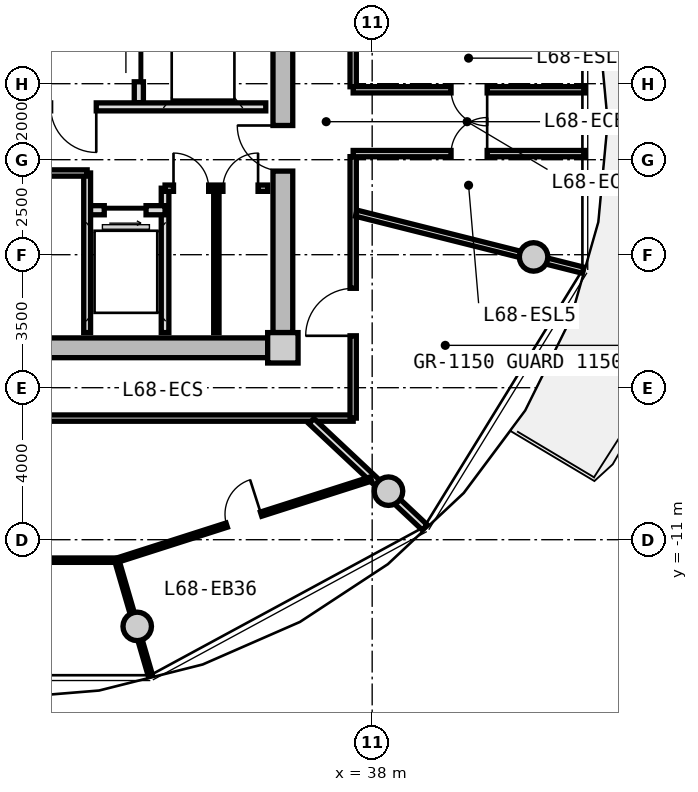
"""IFC4 building model, lengths in metres.
Left out: names, types, materials, properties, quantities, classifications, styles, units other than length and angle.
Written with IfcOpenShell. Run it as: python <this file> out.ifc"""

import sys

from ifc_helpers import new_model, si_unit, direction, frame, frame_2d, origin, origin_2d, place, context, subcontext, project, spatial, rectangle, circle, extrude, source, transform, mapped, element, fill, save


model = new_model("IFC4")
c1 = context("Model", 3, precision=1e-05, world=origin(), true_north=direction((0.0, 1.0)))
c2 = subcontext(c1, "Body", "Model", "MODEL_VIEW")
j1 = project(units=[si_unit("LENGTHUNIT", "METRE"), si_unit("PLANEANGLEUNIT", "RADIAN")], contexts=[c1])
p1 = place(None, origin())
s1 = spatial("IfcSite", under=j1, at=p1, CompositionType="ELEMENT")
p2 = place(p1, origin())
s2 = spatial("IfcBuilding", under=s1, at=p2, CompositionType="ELEMENT")
p3 = place(p2, frame((0.0, 0.0, 220.0)))
s3 = spatial("IfcBuildingStorey", under=s2, at=p3, CompositionType="ELEMENT", Elevation=220.0)
m1 = source(origin(), c2, "Body", "SweptSolid", [
    extrude(rectangle(XDim=0.8, YDim=0.8, at=origin_2d()), origin(), (0.0, 0.0, 1.0), 3.05),
])
p4 = place(p3, frame((35.65, -5.95, 0.0), z_axis=(0.0, 0.0, 1.0), x_axis=(1.0, 0.0, 0.0)))
e1 = element("IfcColumn", 1, at=p4, inside=s3, PredefinedType="COLUMN", context=c2, shape_type="MappedRepresentation", body=[
    mapped(m1, transform((0.0, 0.0, 0.0), x_axis=(1.0, 0.0, 0.0), y_axis=(0.0, 1.0, 0.0), z_axis=(0.0, 0.0, 1.0), scale=1.0)),
])
m2 = source(origin(), c2, "Body", "SweptSolid", [
    extrude(rectangle(XDim=14.5, YDim=0.52, at=frame_2d((7.25, 0.0))), origin(), (0.0, 0.0, 1.0), 2.76),
])
p5 = place(p3, frame((35.25, -5.95, 0.0), z_axis=(0.0, 0.0, 1.0), x_axis=(-1.0, 0.0, 0.0)))
e2 = element("IfcWall", 2, at=p5, inside=s3, PredefinedType="SHEAR", context=c2, shape_type="MappedRepresentation", body=[
    mapped(m2, transform((0.0, 0.0, 0.0), x_axis=(1.0, 0.0, 0.0), y_axis=(0.0, 1.0, 0.0), z_axis=(0.0, 0.0, 1.0), scale=1.0)),
])
m3 = source(origin(), c2, "Body", "SweptSolid", [
    extrude(rectangle(XDim=11.1, YDim=0.52, at=frame_2d((5.55, 0.0))), origin(), (0.0, 0.0, 1.0), 2.76),
])
p6 = place(p3, frame((35.65, 5.55, 0.0), z_axis=(0.0, 0.0, 1.0), x_axis=(0.0, -1.0, 0.0)))
e3 = element("IfcWall", 3, at=p6, inside=s3, PredefinedType="SHEAR", context=c2, shape_type="MappedRepresentation", body=[
    mapped(m3, transform((0.0, 0.0, 0.0), x_axis=(1.0, 0.0, 0.0), y_axis=(0.0, 1.0, 0.0), z_axis=(0.0, 0.0, 1.0), scale=1.0)),
])
p7 = place(p6, frame((5.65, 0.0, 0.0)))
e4 = element("IfcOpeningElement", 4, at=p7, cuts=e3, PredefinedType="OPENING", context=c2, shape_type="SweptSolid", body=[
    extrude(rectangle(XDim=1.2, YDim=2.15, at=frame_2d((0.6, 1.075))), frame((0.0, 0.27, 0.0), z_axis=(0.0, -1.0, 0.0), x_axis=(1.0, 0.0, 0.0)), (0.0, 0.0, 1.0), 0.54),
])
m4 = source(origin(), c2, "Body", "SweptSolid", [
    extrude(circle(Radius=0.375, at=origin_2d()), origin(), (0.0, 0.0, 1.0), 3.05),
])
for number, where, z_axis, x_axis in (
    (5, (31.818, -13.281, 0.0), (0.0, 0.0, 1.0), (1.0, 0.0, 0.0)),
    (6, (38.43, -9.723, 0.0), (0.0, 0.0, 1.0), (1.0, 0.0, 0.0)),
    (7, (42.247, -3.559, 0.0), (0.0, 0.0, 1.0), (1.0, 0.0, 0.0)),
):
    element("IfcColumn", number, at=place(p3, frame(where, z_axis=z_axis, x_axis=x_axis)), inside=s3, PredefinedType="COLUMN", context=c2, shape_type="MappedRepresentation", body=[
        mapped(m4, transform((0.0, 0.0, 0.0), x_axis=(1.0, 0.0, 0.0), y_axis=(0.0, 1.0, 0.0), z_axis=(0.0, 0.0, 1.0), scale=1.0)),
    ])
m5 = source(origin(), c2, "Body", "SweptSolid", [
    extrude(rectangle(XDim=5.0, YDim=0.24, at=frame_2d((2.5, 0.0))), origin(), (0.0, 0.0, 1.0), 2.745),
])
p8 = place(p3, frame((31.86, 0.5, 0.0), z_axis=(0.0, 0.0, 1.0), x_axis=(0.0, 1.0, 0.0)))
e8 = element("IfcWall", 8, at=p8, inside=s3, PredefinedType="PARTITIONING", context=c2, shape_type="MappedRepresentation", body=[
    mapped(m5, transform((0.0, 0.0, 0.0), x_axis=(1.0, 0.0, 0.0), y_axis=(0.0, 1.0, 0.0), z_axis=(0.0, 0.0, 1.0), scale=1.0)),
])
p9 = place(p8, frame((3.05, 0.0, 0.0)))
e9 = element("IfcOpeningElement", 9, at=p9, cuts=e8, PredefinedType="OPENING", context=c2, shape_type="SweptSolid", body=[
    extrude(rectangle(XDim=1.3, YDim=2.2, at=frame_2d((0.65, 1.1))), frame((0.0, 0.13, 0.0), z_axis=(0.0, -1.0, 0.0), x_axis=(1.0, 0.0, 0.0)), (0.0, 0.0, 1.0), 0.26),
])
p10 = place(p8, frame((0.55, 0.0, 0.0)))
e10 = element("IfcOpeningElement", 10, at=p10, cuts=e8, PredefinedType="OPENING", context=c2, shape_type="SweptSolid", body=[
    extrude(rectangle(XDim=1.3, YDim=2.2, at=frame_2d((0.65, 1.1))), frame((0.0, 0.13, 0.0), z_axis=(0.0, -1.0, 0.0), x_axis=(1.0, 0.0, 0.0)), (0.0, 0.0, 1.0), 0.26),
])
m6 = source(origin(), c2, "Body", "SweptSolid", [
    extrude(rectangle(XDim=6.66, YDim=0.21, at=frame_2d((3.33, 0.0))), origin(), (0.0, 0.0, 1.0), 2.745),
])
p11 = place(p3, frame((28.54, 0.39, 0.0), z_axis=(0.0, 0.0, 1.0), x_axis=(1.0, 0.0, 0.0)))
e11 = element("IfcWall", 11, at=p11, inside=s3, PredefinedType="PARTITIONING", context=c2, shape_type="MappedRepresentation", body=[
    mapped(m6, transform((0.0, 0.0, 0.0), x_axis=(1.0, 0.0, 0.0), y_axis=(0.0, 1.0, 0.0), z_axis=(0.0, 0.0, 1.0), scale=1.0)),
])
p12 = place(p11, frame((1.0, 0.0, 0.0)))
e12 = element("IfcOpeningElement", 12, at=p12, cuts=e11, PredefinedType="OPENING", context=c2, shape_type="SweptSolid", body=[
    extrude(rectangle(XDim=1.2, YDim=2.15, at=frame_2d((0.6, 1.075))), frame((0.0, 0.115, 0.0), z_axis=(0.0, -1.0, 0.0), x_axis=(1.0, 0.0, 0.0)), (0.0, 0.0, 1.0), 0.23),
])
m7 = source(origin(), c2, "Body", "SweptSolid", [
    extrude(rectangle(XDim=3.8, YDim=0.2, at=frame_2d((1.9, 0.0))), origin(), (0.0, 0.0, 1.0), 2.745),
])
p13 = place(p3, frame((32.55, -5.55, 0.0), z_axis=(0.0, 0.0, 1.0), x_axis=(0.0, 1.0, 0.0)))
e13 = element("IfcWall", 13, at=p13, inside=s3, PredefinedType="PARTITIONING", context=c2, shape_type="MappedRepresentation", body=[
    mapped(m7, transform((0.0, 0.0, 0.0), x_axis=(1.0, 0.0, 0.0), y_axis=(0.0, 1.0, 0.0), z_axis=(0.0, 0.0, 1.0), scale=1.0)),
])
m8 = source(origin(), c2, "Body", "SweptSolid", [
    extrude(rectangle(XDim=2.05, YDim=0.24, at=frame_2d((1.025, 0.0))), origin(), (0.0, 0.0, 1.0), 2.745),
])
p14 = place(p3, frame((30.5, -2.33, 0.0), z_axis=(0.0, 0.0, 1.0), x_axis=(1.0, 0.0, 0.0)))
e14 = element("IfcWall", 14, at=p14, inside=s3, PredefinedType="PARTITIONING", context=c2, shape_type="MappedRepresentation", body=[
    mapped(m8, transform((0.0, 0.0, 0.0), x_axis=(1.0, 0.0, 0.0), y_axis=(0.0, 1.0, 0.0), z_axis=(0.0, 0.0, 1.0), scale=1.0)),
])
p15 = place(p14, frame((0.45, 0.0, 0.0)))
e15 = element("IfcOpeningElement", 15, at=p15, cuts=e14, PredefinedType="OPENING", context=c2, shape_type="SweptSolid", body=[
    extrude(rectangle(XDim=1.1, YDim=2.2, at=frame_2d((0.55, 1.1))), frame((0.0, 0.13, 0.0), z_axis=(0.0, -1.0, 0.0), x_axis=(1.0, 0.0, 0.0)), (0.0, 0.0, 1.0), 0.26),
])
m9 = source(origin(), c2, "Body", "SweptSolid", [
    extrude(rectangle(XDim=4.2, YDim=0.18, at=frame_2d((2.1, 0.0))), origin(), (0.0, 0.0, 1.0), 2.745),
])
p16 = place(p3, frame((30.5, -5.55, 0.0), z_axis=(0.0, 0.0, 1.0), x_axis=(0.0, 1.0, 0.0)))
e16 = element("IfcWall", 16, at=p16, inside=s3, PredefinedType="PARTITIONING", context=c2, shape_type="MappedRepresentation", body=[
    mapped(m9, transform((0.0, 0.0, 0.0), x_axis=(1.0, 0.0, 0.0), y_axis=(0.0, 1.0, 0.0), z_axis=(0.0, 0.0, 1.0), scale=1.0)),
])
m10 = source(origin(), c2, "Body", "SweptSolid", [
    extrude(rectangle(XDim=4.77, YDim=0.165, at=frame_2d((2.385, 0.0))), origin(), (0.0, 0.0, 1.0), 2.745),
])
p17 = place(p3, frame((25.73, -1.35, 0.0), z_axis=(0.0, 0.0, 1.0), x_axis=(1.0, 0.0, 0.0)))
e17 = element("IfcWall", 17, at=p17, inside=s3, PredefinedType="PARTITIONING", context=c2, shape_type="MappedRepresentation", body=[
    mapped(m10, transform((0.0, 0.0, 0.0), x_axis=(1.0, 0.0, 0.0), y_axis=(0.0, 1.0, 0.0), z_axis=(0.0, 0.0, 1.0), scale=1.0)),
])
p18 = place(p17, frame((1.85, 0.0, 0.0)))
e18 = element("IfcOpeningElement", 18, at=p18, cuts=e17, PredefinedType="OPENING", context=c2, shape_type="SweptSolid", body=[
    extrude(rectangle(XDim=1.0, YDim=2.1, at=frame_2d((0.5, 1.05))), frame((0.0, 0.093, 0.0), z_axis=(0.0, -1.0, 0.0), x_axis=(1.0, 0.0, 0.0)), (0.0, 0.0, 1.0), 0.185),
])
m11 = source(origin(), c2, "Body", "SweptSolid", [
    extrude(rectangle(XDim=2.7, YDim=0.165, at=frame_2d((1.35, 0.0))), origin(), (0.0, 0.0, 1.0), 2.745),
])
p19 = place(p3, frame((32.55, -1.75, 0.0), z_axis=(0.0, 0.0, 1.0), x_axis=(1.0, 0.0, 0.0)))
e19 = element("IfcWall", 19, at=p19, inside=s3, PredefinedType="PARTITIONING", context=c2, shape_type="MappedRepresentation", body=[
    mapped(m11, transform((0.0, 0.0, 0.0), x_axis=(1.0, 0.0, 0.0), y_axis=(0.0, 1.0, 0.0), z_axis=(0.0, 0.0, 1.0), scale=1.0)),
])
p20 = place(p19, frame((0.222, 0.0, 0.0)))
e20 = element("IfcOpeningElement", 20, at=p20, cuts=e19, PredefinedType="OPENING", context=c2, shape_type="SweptSolid", body=[
    extrude(rectangle(XDim=0.925, YDim=2.1, at=frame_2d((0.462, 1.05))), frame((0.0, 0.093, 0.0), z_axis=(0.0, -1.0, 0.0), x_axis=(1.0, 0.0, 0.0)), (0.0, 0.0, 1.0), 0.185),
])
p21 = place(p19, frame((1.522, 0.0, 0.0)))
e21 = element("IfcOpeningElement", 21, at=p21, cuts=e19, PredefinedType="OPENING", context=c2, shape_type="SweptSolid", body=[
    extrude(rectangle(XDim=0.925, YDim=2.1, at=frame_2d((0.462, 1.05))), frame((0.0, 0.093, 0.0), z_axis=(0.0, -1.0, 0.0), x_axis=(1.0, 0.0, 0.0)), (0.0, 0.0, 1.0), 0.185),
])
m12 = source(origin(), c2, "Body", "SweptSolid", [
    extrude(rectangle(XDim=3.8, YDim=0.14, at=frame_2d((1.9, 0.0))), origin(), (0.0, 0.0, 1.0), 2.745),
])
p22 = place(p3, frame((33.9, -5.55, 0.0), z_axis=(0.0, 0.0, 1.0), x_axis=(0.0, 1.0, 0.0)))
e22 = element("IfcWall", 22, at=p22, inside=s3, PredefinedType="PARTITIONING", context=c2, shape_type="MappedRepresentation", body=[
    mapped(m12, transform((0.0, 0.0, 0.0), x_axis=(1.0, 0.0, 0.0), y_axis=(0.0, 1.0, 0.0), z_axis=(0.0, 0.0, 1.0), scale=1.0)),
])
m13 = source(origin(), c2, "Body", "SweptSolid", [
    extrude(rectangle(XDim=19.0, YDim=0.165, at=frame_2d((9.5, 0.0))), origin(), (0.0, 0.0, 1.0), 2.745),
])
p23 = place(p3, frame((37.5, -7.8, 0.0), z_axis=(0.0, 0.0, 1.0), x_axis=(-1.0, 0.0, 0.0)))
e23 = element("IfcWall", 23, at=p23, inside=s3, PredefinedType="PARTITIONING", context=c2, shape_type="MappedRepresentation", body=[
    mapped(m13, transform((0.0, 0.0, 0.0), x_axis=(1.0, 0.0, 0.0), y_axis=(0.0, 1.0, 0.0), z_axis=(0.0, 0.0, 1.0), scale=1.0)),
])
p24 = place(p23, frame((9.392, 0.0, 0.0)))
e24 = element("IfcOpeningElement", 24, at=p24, cuts=e23, PredefinedType="OPENING", context=c2, shape_type="SweptSolid", body=[
    extrude(rectangle(XDim=1.05, YDim=2.15, at=frame_2d((0.525, 1.075))), frame((0.0, 0.093, 0.0), z_axis=(0.0, -1.0, 0.0), x_axis=(1.0, 0.0, 0.0)), (0.0, 0.0, 1.0), 0.185),
])
m14 = source(origin(), c2, "Body", "SweptSolid", [
    extrude(rectangle(XDim=6.88, YDim=0.165, at=frame_2d((3.44, 0.0))), origin(), (0.0, 0.0, 1.0), 2.745),
])
p25 = place(p3, frame((37.5, 7.8, 0.0), z_axis=(0.0, 0.0, 1.0), x_axis=(0.0, -1.0, 0.0)))
e25 = element("IfcWall", 25, at=p25, inside=s3, PredefinedType="PARTITIONING", context=c2, shape_type="MappedRepresentation", body=[
    mapped(m14, transform((0.0, 0.0, 0.0), x_axis=(1.0, 0.0, 0.0), y_axis=(0.0, 1.0, 0.0), z_axis=(0.0, 0.0, 1.0), scale=1.0)),
])
p26 = place(p3, frame((37.5, -0.92, 0.0), z_axis=(0.0, 0.0, 1.0), x_axis=(0.0, -1.0, 0.0)))
e26 = element("IfcWall", 26, at=p26, inside=s3, PredefinedType="PARTITIONING", context=c2, shape_type="MappedRepresentation", body=[
    mapped(m14, transform((0.0, 0.0, 0.0), x_axis=(1.0, 0.0, 0.0), y_axis=(0.0, 1.0, 0.0), z_axis=(0.0, 0.0, 1.0), scale=1.0)),
])
p27 = place(p26, frame((3.464, 0.0, 0.0)))
e27 = element("IfcOpeningElement", 27, at=p27, cuts=e26, PredefinedType="OPENING", context=c2, shape_type="SweptSolid", body=[
    extrude(rectangle(XDim=1.25, YDim=2.2, at=frame_2d((0.625, 1.1))), frame((0.0, 0.093, 0.0), z_axis=(0.0, -1.0, 0.0), x_axis=(1.0, 0.0, 0.0)), (0.0, 0.0, 1.0), 0.185),
])
m15 = source(origin(), c2, "Body", "SweptSolid", [
    extrude(rectangle(XDim=6.157, YDim=0.165, at=frame_2d((3.079, 0.0))), origin(), (0.0, 0.0, 1.0), 2.345),
])
p28 = place(p3, frame((37.58, -2.407, 0.0), z_axis=(0.0, 0.0, 1.0), x_axis=(0.969840867184, -0.243738984038, 0.0)))
e28 = element("IfcWall", 28, at=p28, inside=s3, PredefinedType="PARTITIONING", context=c2, shape_type="MappedRepresentation", body=[
    mapped(m15, transform((0.0, 0.0, 0.0), x_axis=(1.0, 0.0, 0.0), y_axis=(0.0, 1.0, 0.0), z_axis=(0.0, 0.0, 1.0), scale=1.0)),
])
m16 = source(origin(), c2, "Body", "SweptSolid", [
    extrude(rectangle(XDim=6.101, YDim=0.165, at=frame_2d((3.051, 0.0))), origin(), (0.0, 0.0, 1.0), 2.745),
])
p29 = place(p3, frame((37.5, 0.84, 0.0), z_axis=(0.0, 0.0, 1.0), x_axis=(1.0, 0.0, 0.0)))
e29 = element("IfcWall", 29, at=p29, inside=s3, PredefinedType="PARTITIONING", context=c2, shape_type="MappedRepresentation", body=[
    mapped(m16, transform((0.0, 0.0, 0.0), x_axis=(1.0, 0.0, 0.0), y_axis=(0.0, 1.0, 0.0), z_axis=(0.0, 0.0, 1.0), scale=1.0)),
])
p30 = place(p29, frame((2.576, 0.0, 0.0)))
e30 = element("IfcOpeningElement", 30, at=p30, cuts=e29, PredefinedType="OPENING", context=c2, shape_type="SweptSolid", body=[
    extrude(rectangle(XDim=0.95, YDim=2.1, at=frame_2d((0.475, 1.05))), frame((0.0, 0.093, 0.0), z_axis=(0.0, -1.0, 0.0), x_axis=(1.0, 0.0, 0.0)), (0.0, 0.0, 1.0), 0.185),
])
p31 = place(p3, frame((43.601, -0.84, 0.0), z_axis=(0.0, 0.0, 1.0), x_axis=(-1.0, 0.0, 0.0)))
e31 = element("IfcWall", 31, at=p31, inside=s3, PredefinedType="PARTITIONING", context=c2, shape_type="MappedRepresentation", body=[
    mapped(m16, transform((0.0, 0.0, 0.0), x_axis=(1.0, 0.0, 0.0), y_axis=(0.0, 1.0, 0.0), z_axis=(0.0, 0.0, 1.0), scale=1.0)),
])
p32 = place(p31, frame((2.576, 0.0, 0.0)))
e32 = element("IfcOpeningElement", 32, at=p32, cuts=e31, PredefinedType="OPENING", context=c2, shape_type="SweptSolid", body=[
    extrude(rectangle(XDim=0.95, YDim=2.1, at=frame_2d((0.475, 1.05))), frame((0.0, 0.093, 0.0), z_axis=(0.0, -1.0, 0.0), x_axis=(1.0, 0.0, 0.0)), (0.0, 0.0, 1.0), 0.185),
])
m17 = source(origin(), c2, "Body", "SweptSolid", [
    extrude(rectangle(XDim=4.089, YDim=0.19, at=frame_2d((2.044, 0.0))), origin(), (0.0, 0.0, 1.0), 2.345),
])
p33 = place(p3, frame((36.402, -7.88, 0.0), z_axis=(0.0, 0.0, 1.0), x_axis=(0.729401273609, -0.684086092577, 0.0)))
e33 = element("IfcWall", 33, at=p33, inside=s3, PredefinedType="PARTITIONING", context=c2, shape_type="MappedRepresentation", body=[
    mapped(m17, transform((0.0, 0.0, 0.0), x_axis=(1.0, 0.0, 0.0), y_axis=(0.0, 1.0, 0.0), z_axis=(0.0, 0.0, 1.0), scale=1.0)),
])
m18 = source(origin(), c2, "Body", "SweptSolid", [
    extrude(rectangle(XDim=6.558, YDim=0.115, at=frame_2d((3.279, 0.0))), origin(), (0.0, 0.0, 1.0), 2.745),
])
p34 = place(p3, frame((24.721, -11.539, 0.0), z_axis=(0.0, 0.0, 1.0), x_axis=(1.0, 0.0, 0.0)))
e34 = element("IfcWall", 34, at=p34, inside=s3, PredefinedType="PARTITIONING", context=c2, shape_type="MappedRepresentation", body=[
    mapped(m18, transform((0.0, 0.0, 0.0), x_axis=(1.0, 0.0, 0.0), y_axis=(0.0, 1.0, 0.0), z_axis=(0.0, 0.0, 1.0), scale=1.0)),
])
p35 = place(p34, frame((2.804, 0.0, 0.0)))
e35 = element("IfcOpeningElement", 35, at=p35, cuts=e34, PredefinedType="OPENING", context=c2, shape_type="SweptSolid", body=[
    extrude(rectangle(XDim=0.95, YDim=2.1, at=frame_2d((0.475, 1.05))), frame((0.0, 0.067, 0.0), z_axis=(0.0, -1.0, 0.0), x_axis=(1.0, 0.0, 0.0)), (0.0, 0.0, 1.0), 0.135),
])
m19 = source(origin(), c2, "Body", "SweptSolid", [
    extrude(rectangle(XDim=7.024, YDim=0.115, at=frame_2d((3.512, 0.0))), origin(), (0.0, 0.0, 1.0), 2.745),
])
p36 = place(p3, frame((31.28, -11.542, 0.0), z_axis=(0.0, 0.0, 1.0), x_axis=(0.952454006655, 0.304682400552, 0.0)))
e36 = element("IfcWall", 36, at=p36, inside=s3, PredefinedType="PARTITIONING", context=c2, shape_type="MappedRepresentation", body=[
    mapped(m19, transform((0.0, 0.0, 0.0), x_axis=(1.0, 0.0, 0.0), y_axis=(0.0, 1.0, 0.0), z_axis=(0.0, 0.0, 1.0), scale=1.0)),
])
p37 = place(p36, frame((3.037, 0.0, 0.0)))
e37 = element("IfcOpeningElement", 37, at=p37, cuts=e36, PredefinedType="OPENING", context=c2, shape_type="SweptSolid", body=[
    extrude(rectangle(XDim=0.95, YDim=2.1, at=frame_2d((0.475, 1.05))), frame((0.0, 0.067, 0.0), z_axis=(0.0, -1.0, 0.0), x_axis=(1.0, 0.0, 0.0)), (0.0, 0.0, 1.0), 0.135),
])
m20 = source(origin(), c2, "Body", "SweptSolid", [
    extrude(rectangle(XDim=3.171, YDim=0.115, at=frame_2d((1.585, 0.0))), origin(), (0.0, 0.0, 1.0), 2.345),
])
p38 = place(p3, frame((31.28, -11.542, 0.0), z_axis=(0.0, 0.0, 1.0), x_axis=(0.279893554029, -0.960031040338, 0.0)))
e38 = element("IfcWall", 38, at=p38, inside=s3, PredefinedType="PARTITIONING", context=c2, shape_type="MappedRepresentation", body=[
    mapped(m20, transform((0.0, 0.0, 0.0), x_axis=(1.0, 0.0, 0.0), y_axis=(0.0, 1.0, 0.0), z_axis=(0.0, 0.0, 1.0), scale=1.0)),
])
m21 = source(origin(), c2, "Body", "SweptSolid", [
    extrude(rectangle(XDim=1.3, YDim=2.2, at=frame_2d((0.65, 1.1))), frame((0.0, 0.025, 0.0), z_axis=(0.0, -1.0, 0.0), x_axis=(1.0, 0.0, 0.0)), (0.0, 0.0, 1.0), 0.05),
])
p39 = place(p10, origin())
e39 = element("IfcDoor", 39, at=p39, inside=s3, OperationType="SLIDING_TO_RIGHT", PredefinedType="DOOR", context=c2, shape_type="MappedRepresentation", body=[
    mapped(m21, transform((0.0, 0.0, 0.0), x_axis=(1.0, 0.0, 0.0), y_axis=(0.0, 1.0, 0.0), z_axis=(0.0, 0.0, 1.0), scale=1.0)),
])
fill(e10, e39)
m22 = source(origin(), c2, "Body", "SweptSolid", [
    extrude(rectangle(XDim=1.2, YDim=2.15, at=frame_2d((0.6, 1.075))), frame((0.0, 0.025, 0.0), z_axis=(0.0, -1.0, 0.0), x_axis=(1.0, 0.0, 0.0)), (0.0, 0.0, 1.0), 0.05),
])
p40 = place(p12, frame((1.2, 0.0, 0.0), z_axis=(0.0, 0.0, 1.0), x_axis=(-1.0, 0.0, 0.0)))
e40 = element("IfcDoor", 40, at=p40, inside=s3, OperationType="SINGLE_SWING_LEFT", PredefinedType="DOOR", context=c2, shape_type="MappedRepresentation", body=[
    mapped(m22, transform((0.0, 0.0, 0.0), x_axis=(1.0, 0.0, 0.0), y_axis=(0.0, 1.0, 0.0), z_axis=(0.0, 0.0, 1.0), scale=1.0)),
])
fill(e12, e40)
p41 = place(p7, frame((1.2, 0.0, 0.0), z_axis=(0.0, 0.0, 1.0), x_axis=(-1.0, 0.0, 0.0)))
e41 = element("IfcDoor", 41, at=p41, inside=s3, OperationType="SINGLE_SWING_RIGHT", PredefinedType="DOOR", context=c2, shape_type="MappedRepresentation", body=[
    mapped(m22, transform((0.0, 0.0, 0.0), x_axis=(1.0, 0.0, 0.0), y_axis=(0.0, 1.0, 0.0), z_axis=(0.0, 0.0, 1.0), scale=1.0)),
])
fill(e4, e41)
m23 = source(origin(), c2, "Body", "SweptSolid", [
    extrude(rectangle(XDim=1.1, YDim=2.2, at=frame_2d((0.55, 1.1))), frame((0.0, 0.025, 0.0), z_axis=(0.0, -1.0, 0.0), x_axis=(1.0, 0.0, 0.0)), (0.0, 0.0, 1.0), 0.05),
])
p42 = place(p15, frame((1.1, 0.0, 0.0), z_axis=(0.0, 0.0, 1.0), x_axis=(-1.0, 0.0, 0.0)))
e42 = element("IfcDoor", 42, at=p42, inside=s3, OperationType="SLIDING_TO_RIGHT", PredefinedType="DOOR", context=c2, shape_type="MappedRepresentation", body=[
    mapped(m23, transform((0.0, 0.0, 0.0), x_axis=(1.0, 0.0, 0.0), y_axis=(0.0, 1.0, 0.0), z_axis=(0.0, 0.0, 1.0), scale=1.0)),
])
fill(e15, e42)
m24 = source(origin(), c2, "Body", "SweptSolid", [
    extrude(rectangle(XDim=0.925, YDim=2.1, at=frame_2d((0.462, 1.05))), frame((0.0, 0.025, 0.0), z_axis=(0.0, -1.0, 0.0), x_axis=(1.0, 0.0, 0.0)), (0.0, 0.0, 1.0), 0.05),
])
p43 = place(p20, origin())
e43 = element("IfcDoor", 43, at=p43, inside=s3, OperationType="SINGLE_SWING_LEFT", PredefinedType="DOOR", context=c2, shape_type="MappedRepresentation", body=[
    mapped(m24, transform((0.0, 0.0, 0.0), x_axis=(1.0, 0.0, 0.0), y_axis=(0.0, 1.0, 0.0), z_axis=(0.0, 0.0, 1.0), scale=1.0)),
])
fill(e20, e43)
p44 = place(p21, origin())
e44 = element("IfcDoor", 44, at=p44, inside=s3, OperationType="SINGLE_SWING_RIGHT", PredefinedType="DOOR", context=c2, shape_type="MappedRepresentation", body=[
    mapped(m24, transform((0.0, 0.0, 0.0), x_axis=(1.0, 0.0, 0.0), y_axis=(0.0, 1.0, 0.0), z_axis=(0.0, 0.0, 1.0), scale=1.0)),
])
fill(e21, e44)
m25 = source(origin(), c2, "Body", "SweptSolid", [
    extrude(rectangle(XDim=0.95, YDim=2.1, at=frame_2d((0.475, 1.05))), frame((0.0, 0.025, 0.0), z_axis=(0.0, -1.0, 0.0), x_axis=(1.0, 0.0, 0.0)), (0.0, 0.0, 1.0), 0.05),
])
p45 = place(p32, frame((0.95, 0.0, 0.0), z_axis=(0.0, 0.0, 1.0), x_axis=(-1.0, 0.0, 0.0)))
e45 = element("IfcDoor", 45, at=p45, inside=s3, OperationType="SINGLE_SWING_RIGHT", PredefinedType="DOOR", context=c2, shape_type="MappedRepresentation", body=[
    mapped(m25, transform((0.0, 0.0, 0.0), x_axis=(1.0, 0.0, 0.0), y_axis=(0.0, 1.0, 0.0), z_axis=(0.0, 0.0, 1.0), scale=1.0)),
])
fill(e32, e45)
p46 = place(p30, frame((0.95, 0.0, 0.0), z_axis=(0.0, 0.0, 1.0), x_axis=(-1.0, 0.0, 0.0)))
e46 = element("IfcDoor", 46, at=p46, inside=s3, OperationType="SINGLE_SWING_LEFT", PredefinedType="DOOR", context=c2, shape_type="MappedRepresentation", body=[
    mapped(m25, transform((0.0, 0.0, 0.0), x_axis=(1.0, 0.0, 0.0), y_axis=(0.0, 1.0, 0.0), z_axis=(0.0, 0.0, 1.0), scale=1.0)),
])
fill(e30, e46)
p47 = place(p37, origin())
e47 = element("IfcDoor", 47, at=p47, inside=s3, OperationType="SINGLE_SWING_RIGHT", PredefinedType="DOOR", context=c2, shape_type="MappedRepresentation", body=[
    mapped(m25, transform((0.0, 0.0, 0.0), x_axis=(1.0, 0.0, 0.0), y_axis=(0.0, 1.0, 0.0), z_axis=(0.0, 0.0, 1.0), scale=1.0)),
])
fill(e37, e47)
m26 = source(origin(), c2, "Body", "SweptSolid", [
    extrude(rectangle(XDim=1.25, YDim=2.2, at=frame_2d((0.625, 1.1))), frame((0.0, 0.025, 0.0), z_axis=(0.0, -1.0, 0.0), x_axis=(1.0, 0.0, 0.0)), (0.0, 0.0, 1.0), 0.05),
])
p48 = place(p27, frame((1.25, 0.0, 0.0), z_axis=(0.0, 0.0, 1.0), x_axis=(-1.0, 0.0, 0.0)))
e48 = element("IfcDoor", 48, at=p48, inside=s3, OperationType="SINGLE_SWING_LEFT", PredefinedType="DOOR", context=c2, shape_type="MappedRepresentation", body=[
    mapped(m26, transform((0.0, 0.0, 0.0), x_axis=(1.0, 0.0, 0.0), y_axis=(0.0, 1.0, 0.0), z_axis=(0.0, 0.0, 1.0), scale=1.0)),
])
fill(e27, e48)
save(model, sys.argv[1])
